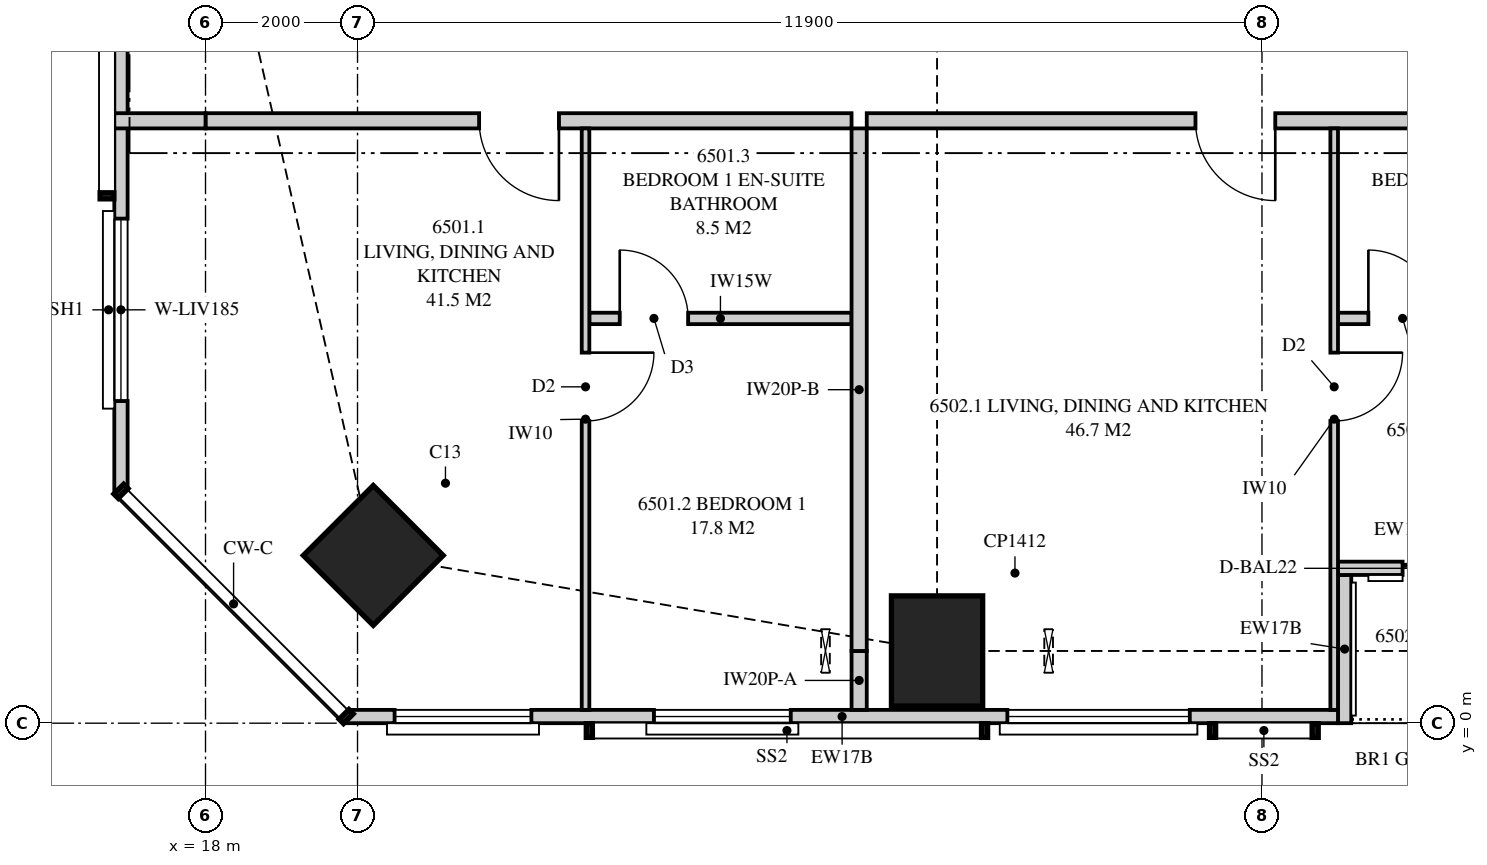
"""IFC4 building model, lengths in metres.
Left out: names, types, materials, properties, quantities, classifications, styles, units other than length and angle.
Written with IfcOpenShell. Run it as: python <this file> out.ifc"""

import sys

from ifc_helpers import new_model, si_unit, direction, frame, frame_2d, origin, origin_2d, place, context, subcontext, project, spatial, polyline, rectangle, outline, extrude, element, fill, save


model = new_model("IFC4")
c1 = context("Model", 3, precision=1e-05, world=origin(), true_north=direction((0.0, 1.0)))
c2 = subcontext(c1, "Body", "Model", "MODEL_VIEW")
j1 = project(units=[si_unit("LENGTHUNIT", "METRE"), si_unit("PLANEANGLEUNIT", "RADIAN")], contexts=[c1])
p1 = place(None, origin())
s1 = spatial("IfcSite", under=j1, at=p1, CompositionType="ELEMENT")
p2 = place(p1, origin())
s2 = spatial("IfcBuilding", under=s1, at=p2, CompositionType="ELEMENT")
p3 = place(p2, frame((0.0, 0.0, 238.95)))
s3 = spatial("IfcBuildingStorey", under=s2, at=p3, CompositionType="ELEMENT", Elevation=238.95)
p4 = place(p3, frame((20.207, 2.207, 0.0), z_axis=(0.0, 0.0, 1.0), x_axis=(0.707106781187, 0.707106781187, 0.0)))
e1 = element("IfcColumn", 1, at=p4, inside=s3, PredefinedType="COLUMN", context=c2, shape_type="SweptSolid", body=[
    extrude(rectangle(XDim=1.3, YDim=1.3, at=origin_2d()), origin(), (0.0, 0.0, 1.0), 3.5),
])
p5 = place(p3, frame((27.625, 0.95, 0.0), z_axis=(0.0, 0.0, 1.0), x_axis=(0.0, 1.0, 0.0)))
e2 = element("IfcColumn", 2, at=p5, inside=s3, PredefinedType="COLUMN", context=c2, shape_type="SweptSolid", body=[
    extrude(rectangle(XDim=1.45, YDim=1.2, at=origin_2d()), origin(), (0.0, 0.0, 1.0), 3.5),
])
p6 = place(p3, frame((19.851, 0.087, 0.0), z_axis=(0.0, 0.0, 1.0), x_axis=(1.0, 0.0, 0.0)))
e3 = element("IfcWall", 3, at=p6, inside=s3, PredefinedType="SOLIDWALL", context=c2, shape_type="SweptSolid", body=[
    extrude(outline(polyline([(0.0, 0.0), (13.049, 0.0), (13.049, 2.3), (7.774, 2.3), (7.774, 3.26), (7.642, 3.26), (7.642, 2.3), (7.559, 2.3), (7.559, 3.26), (0.0, 3.26), (0.0, 0.0)])), frame((0.0, 0.087, 0.0), z_axis=(0.0, -1.0, 0.0), x_axis=(1.0, 0.0, 0.0)), (0.0, 0.0, 1.0), 0.175),
])
p7 = place(p6, frame((0.636, 0.0, 0.4)))
e4 = element("IfcOpeningElement", 4, at=p7, cuts=e3, PredefinedType="OPENING", context=c2, shape_type="SweptSolid", body=[
    extrude(rectangle(XDim=1.8, YDim=1.85, at=frame_2d((0.9, 0.925))), frame((0.0, 0.097, 0.0), z_axis=(0.0, -1.0, 0.0), x_axis=(1.0, 0.0, 0.0)), (0.0, 0.0, 1.0), 0.195),
])
p8 = place(p6, frame((4.049, 0.0, 0.4)))
e5 = element("IfcOpeningElement", 5, at=p8, cuts=e3, PredefinedType="OPENING", context=c2, shape_type="SweptSolid", body=[
    extrude(rectangle(XDim=1.8, YDim=1.85, at=frame_2d((0.9, 0.925))), frame((0.0, 0.097, 0.0), z_axis=(0.0, -1.0, 0.0), x_axis=(1.0, 0.0, 0.0)), (0.0, 0.0, 1.0), 0.195),
])
p9 = place(p6, frame((8.699, 0.0, 0.4)))
e6 = element("IfcOpeningElement", 6, at=p9, cuts=e3, PredefinedType="OPENING", context=c2, shape_type="SweptSolid", body=[
    extrude(rectangle(XDim=2.4, YDim=1.85, at=frame_2d((1.2, 0.925))), frame((0.0, 0.097, 0.0), z_axis=(0.0, -1.0, 0.0), x_axis=(1.0, 0.0, 0.0)), (0.0, 0.0, 1.0), 0.195),
])
p10 = place(p3, frame((32.9, 2.038, 0.0), z_axis=(0.0, 0.0, 1.0), x_axis=(1.0, 0.0, 0.0)))
e7 = element("IfcWall", 7, at=p10, inside=s3, PredefinedType="SOLIDWALL", context=c2, shape_type="SweptSolid", body=[
    extrude(outline(polyline([(0.0, 0.0), (3.5, 0.0), (3.5, 2.66), (3.15, 2.66), (3.15, 3.26), (0.0, 3.26), (0.0, 0.0)])), frame((0.0, 0.087, 0.0), z_axis=(0.0, -1.0, 0.0), x_axis=(1.0, 0.0, 0.0)), (0.0, 0.0, 1.0), 0.175),
])
p11 = place(p10, frame((0.85, 0.0, 0.0)))
e8 = element("IfcOpeningElement", 8, at=p11, cuts=e7, PredefinedType="OPENING", context=c2, shape_type="SweptSolid", body=[
    extrude(rectangle(XDim=1.8, YDim=2.25, at=frame_2d((0.9, 1.125))), frame((0.0, 0.097, 0.0), z_axis=(0.0, -1.0, 0.0), x_axis=(1.0, 0.0, 0.0)), (0.0, 0.0, 1.0), 0.195),
])
p12 = place(p3, frame((32.988, 0.0, 0.0), z_axis=(0.0, 0.0, 1.0), x_axis=(0.0, 1.0, 0.0)))
e9 = element("IfcWall", 9, at=p12, inside=s3, PredefinedType="SOLIDWALL", context=c2, shape_type="SweptSolid", body=[
    extrude(outline(polyline([(0.0, 0.0), (1.95, 0.0), (1.95, 3.26), (1.75, 3.26), (1.75, 2.3), (0.15, 2.3), (0.15, 3.26), (0.0, 3.26), (0.0, 0.0)])), frame((0.0, 0.087, 0.0), z_axis=(0.0, -1.0, 0.0), x_axis=(1.0, 0.0, 0.0)), (0.0, 0.0, 1.0), 0.175),
])
p13 = place(p3, frame((16.887, 30.949, 0.0), z_axis=(0.0, 0.0, 1.0), x_axis=(0.0, -1.0, 0.0)))
e10 = element("IfcWall", 10, at=p13, inside=s3, PredefinedType="SOLIDWALL", context=c2, shape_type="SweptSolid", body=[
    extrude(outline(polyline([(0.0, 0.0), (27.897, 0.0), (27.897, 3.26), (18.148, 3.26), (18.148, 2.3), (18.125, 2.3), (18.125, 3.26), (17.949, 3.26), (17.949, 2.3), (5.949, 2.3), (5.949, 3.26), (0.0, 3.26), (0.0, 0.0)])), frame((0.0, 0.087, 0.0), z_axis=(0.0, -1.0, 0.0), x_axis=(1.0, 0.0, 0.0)), (0.0, 0.0, 1.0), 0.175),
])
p14 = place(p13, frame((11.849, 0.0, 0.4)))
e11 = element("IfcOpeningElement", 11, at=p14, cuts=e10, PredefinedType="OPENING", context=c2, shape_type="SweptSolid", body=[
    extrude(rectangle(XDim=1.2, YDim=1.85, at=frame_2d((0.6, 0.925))), frame((0.0, 0.097, 0.0), z_axis=(0.0, -1.0, 0.0), x_axis=(1.0, 0.0, 0.0)), (0.0, 0.0, 1.0), 0.195),
])
p15 = place(p13, frame((24.311, 0.0, 0.4)))
e12 = element("IfcOpeningElement", 12, at=p15, cuts=e10, PredefinedType="OPENING", context=c2, shape_type="SweptSolid", body=[
    extrude(rectangle(XDim=2.4, YDim=1.85, at=frame_2d((1.2, 0.925))), frame((0.0, 0.097, 0.0), z_axis=(0.0, -1.0, 0.0), x_axis=(1.0, 0.0, 0.0)), (0.0, 0.0, 1.0), 0.195),
])
p16 = place(p3, frame((26.6, 0.175, 0.0), z_axis=(0.0, 0.0, 1.0), x_axis=(0.0, 1.0, 0.0)))
e13 = element("IfcWall", 13, at=p16, inside=s3, PredefinedType="PARTITIONING", context=c2, shape_type="SweptSolid", body=[
    extrude(outline(polyline([(0.0, 0.0), (0.775, 0.0), (0.775, 2.3), (0.026, 2.3), (0.026, 3.26), (0.0, 3.26), (0.0, 0.0)])), frame((0.0, 0.1, 0.0), z_axis=(0.0, -1.0, 0.0), x_axis=(1.0, 0.0, 0.0)), (0.0, 0.0, 1.0), 0.2),
])
p17 = place(p3, frame((26.6, 0.95, 0.0), z_axis=(0.0, 0.0, 1.0), x_axis=(0.0, 1.0, 0.0)))
e14 = element("IfcWall", 14, at=p17, inside=s3, PredefinedType="PARTITIONING", context=c2, shape_type="SweptSolid", body=[
    extrude(outline(polyline([(0.0, 0.0), (6.875, 0.0), (6.875, 2.66), (1.097, 2.66), (1.097, 2.3), (0.0, 2.3), (0.0, 0.0)])), frame((0.0, 0.1, 0.0), z_axis=(0.0, -1.0, 0.0), x_axis=(1.0, 0.0, 0.0)), (0.0, 0.0, 1.0), 0.2),
])
p18 = place(p3, frame((18.0, 7.925, 0.0), z_axis=(0.0, 0.0, 1.0), x_axis=(1.0, 0.0, 0.0)))
e15 = element("IfcWall", 15, at=p18, inside=s3, PredefinedType="PARTITIONING", context=c2, shape_type="SweptSolid", body=[
    extrude(outline(polyline([(0.0, 0.0), (8.5, 0.0), (8.5, 3.26), (8.5, 2.66), (8.315, 2.66), (8.315, 3.26), (1.839, 3.26), (1.839, 2.3), (0.0, 2.3), (0.0, 3.26), (0.0, 0.0)])), frame((0.0, 0.1, 0.0), z_axis=(0.0, -1.0, 0.0), x_axis=(1.0, 0.0, 0.0)), (0.0, 0.0, 1.0), 0.2),
])
p19 = place(p18, frame((3.6, 0.0, 0.0)))
e16 = element("IfcOpeningElement", 16, at=p19, cuts=e15, PredefinedType="OPENING", context=c2, shape_type="SweptSolid", body=[
    extrude(rectangle(XDim=1.05, YDim=2.2, at=frame_2d((0.525, 1.1))), frame((0.0, 0.11, 0.0), z_axis=(0.0, -1.0, 0.0), x_axis=(1.0, 0.0, 0.0)), (0.0, 0.0, 1.0), 0.22),
])
p20 = place(p3, frame((23.0, 0.175, 0.0), z_axis=(0.0, 0.0, 1.0), x_axis=(0.0, 1.0, 0.0)))
e17 = element("IfcWall", 17, at=p20, inside=s3, PredefinedType="PARTITIONING", context=c2, shape_type="SweptSolid", body=[
    extrude(outline(polyline([(0.0, 0.0), (7.65, 0.0), (7.65, 3.26), (2.431, 3.26), (2.431, 2.3), (0.687, 2.3), (0.687, 3.26), (0.0, 3.26), (0.0, 0.0)])), frame((0.0, 0.05, 0.0), z_axis=(0.0, -1.0, 0.0), x_axis=(1.0, 0.0, 0.0)), (0.0, 0.0, 1.0), 0.1),
])
p21 = place(p20, frame((3.8, 0.0, 0.0)))
e18 = element("IfcOpeningElement", 18, at=p21, cuts=e17, PredefinedType="OPENING", context=c2, shape_type="SweptSolid", body=[
    extrude(rectangle(XDim=0.9, YDim=2.1, at=frame_2d((0.45, 1.05))), frame((0.0, 0.06, 0.0), z_axis=(0.0, -1.0, 0.0), x_axis=(1.0, 0.0, 0.0)), (0.0, 0.0, 1.0), 0.12),
])
p22 = place(p3, frame((23.05, 5.325, 0.0), z_axis=(0.0, 0.0, 1.0), x_axis=(1.0, 0.0, 0.0)))
e19 = element("IfcWall", 19, at=p22, inside=s3, PredefinedType="PLUMBINGWALL", context=c2, shape_type="SweptSolid", body=[
    extrude(outline(polyline([(0.0, 0.0), (3.45, 0.0), (3.45, 3.26), (3.45, 2.66), (3.29, 2.66), (3.29, 3.26), (0.0, 3.26), (0.0, 0.0)])), frame((0.0, 0.075, 0.0), z_axis=(0.0, -1.0, 0.0), x_axis=(1.0, 0.0, 0.0)), (0.0, 0.0, 1.0), 0.15),
])
p23 = place(p22, frame((0.4, 0.0, 0.0)))
e20 = element("IfcOpeningElement", 20, at=p23, cuts=e19, PredefinedType="OPENING", context=c2, shape_type="SweptSolid", body=[
    extrude(rectangle(XDim=0.9, YDim=2.1, at=frame_2d((0.45, 1.05))), frame((0.0, 0.085, 0.0), z_axis=(0.0, -1.0, 0.0), x_axis=(1.0, 0.0, 0.0)), (0.0, 0.0, 1.0), 0.17),
])
p24 = place(p3, frame((26.7, 7.925, 0.0), z_axis=(0.0, 0.0, 1.0), x_axis=(1.0, 0.0, 0.0)))
e21 = element("IfcWall", 21, at=p24, inside=s3, PredefinedType="PARTITIONING", context=c2, shape_type="SweptSolid", body=[
    extrude(outline(polyline([(0.0, 0.0), (9.65, 0.0), (9.65, 3.26), (9.65, 2.66), (9.24, 2.66), (9.24, 3.26), (2.235, 3.26), (2.235, 2.66), (0.0, 2.66), (0.0, 3.26), (0.0, 0.0)])), frame((0.0, 0.1, 0.0), z_axis=(0.0, -1.0, 0.0), x_axis=(1.0, 0.0, 0.0)), (0.0, 0.0, 1.0), 0.2),
])
p25 = place(p24, frame((4.325, 0.0, 0.0)))
e22 = element("IfcOpeningElement", 22, at=p25, cuts=e21, PredefinedType="OPENING", context=c2, shape_type="SweptSolid", body=[
    extrude(rectangle(XDim=1.05, YDim=2.2, at=frame_2d((0.525, 1.1))), frame((0.0, 0.11, 0.0), z_axis=(0.0, -1.0, 0.0), x_axis=(1.0, 0.0, 0.0)), (0.0, 0.0, 1.0), 0.22),
])
p26 = place(p3, frame((32.85, 0.175, 0.0), z_axis=(0.0, 0.0, 1.0), x_axis=(0.0, 1.0, 0.0)))
e23 = element("IfcWall", 23, at=p26, inside=s3, PredefinedType="PARTITIONING", context=c2, shape_type="SweptSolid", body=[
    extrude(outline(polyline([(0.0, 0.0), (7.65, 0.0), (7.65, 3.26), (1.635, 3.26), (1.635, 2.3), (0.0, 2.3), (0.0, 3.26), (0.0, 0.0)])), frame((0.0, 0.05, 0.0), z_axis=(0.0, -1.0, 0.0), x_axis=(1.0, 0.0, 0.0)), (0.0, 0.0, 1.0), 0.1),
])
p27 = place(p26, frame((3.8, 0.0, 0.0)))
e24 = element("IfcOpeningElement", 24, at=p27, cuts=e23, PredefinedType="OPENING", context=c2, shape_type="SweptSolid", body=[
    extrude(rectangle(XDim=0.9, YDim=2.1, at=frame_2d((0.45, 1.05))), frame((0.0, 0.06, 0.0), z_axis=(0.0, -1.0, 0.0), x_axis=(1.0, 0.0, 0.0)), (0.0, 0.0, 1.0), 0.12),
])
p28 = place(p3, frame((32.9, 5.325, 0.0), z_axis=(0.0, 0.0, 1.0), x_axis=(1.0, 0.0, 0.0)))
e25 = element("IfcWall", 25, at=p28, inside=s3, PredefinedType="PLUMBINGWALL", context=c2, shape_type="SweptSolid", body=[
    extrude(outline(polyline([(0.0, 0.0), (3.45, 0.0), (3.45, 3.26), (3.45, 2.66), (3.065, 2.66), (3.065, 3.26), (0.0, 3.26), (0.0, 0.0)])), frame((0.0, 0.075, 0.0), z_axis=(0.0, -1.0, 0.0), x_axis=(1.0, 0.0, 0.0)), (0.0, 0.0, 1.0), 0.15),
])
p29 = place(p28, frame((0.4, 0.0, 0.0)))
e26 = element("IfcOpeningElement", 26, at=p29, cuts=e25, PredefinedType="OPENING", context=c2, shape_type="SweptSolid", body=[
    extrude(rectangle(XDim=0.9, YDim=2.1, at=frame_2d((0.45, 1.05))), frame((0.0, 0.085, 0.0), z_axis=(0.0, -1.0, 0.0), x_axis=(1.0, 0.0, 0.0)), (0.0, 0.0, 1.0), 0.17),
])
p30 = place(p3, frame((16.8, 7.925, 0.0), z_axis=(0.0, 0.0, 1.0), x_axis=(1.0, 0.0, 0.0)))
e27 = element("IfcWall", 27, at=p30, inside=s3, PredefinedType="PARTITIONING", context=c2, shape_type="SweptSolid", body=[
    extrude(outline(polyline([(0.0, 0.0), (1.2, 0.0), (1.2, 3.26), (1.2, 2.3), (1.172, 2.3), (1.172, 3.26), (0.0, 3.26), (0.0, 0.0)])), frame((0.0, 0.1, 0.0), z_axis=(0.0, -1.0, 0.0), x_axis=(1.0, 0.0, 0.0)), (0.0, 0.0, 1.0), 0.2),
])
p31 = place(p7, origin())
e28 = element("IfcWindow", 28, at=p31, inside=s3, PartitioningType="SINGLE_PANEL", PredefinedType="WINDOW", context=c2, shape_type="SweptSolid", body=[
    extrude(rectangle(XDim=1.8, YDim=1.85, at=frame_2d((0.9, 0.925))), frame((0.0, 0.03, 0.0), z_axis=(0.0, -1.0, 0.0), x_axis=(1.0, 0.0, 0.0)), (0.0, 0.0, 1.0), 0.06),
])
fill(e4, e28)
p32 = place(p8, origin())
e29 = element("IfcWindow", 29, at=p32, inside=s3, PartitioningType="SINGLE_PANEL", PredefinedType="WINDOW", context=c2, shape_type="SweptSolid", body=[
    extrude(rectangle(XDim=1.8, YDim=1.85, at=frame_2d((0.9, 0.925))), frame((0.0, 0.03, 0.0), z_axis=(0.0, -1.0, 0.0), x_axis=(1.0, 0.0, 0.0)), (0.0, 0.0, 1.0), 0.06),
])
fill(e5, e29)
p33 = place(p9, origin())
e30 = element("IfcWindow", 30, at=p33, inside=s3, PartitioningType="SINGLE_PANEL", PredefinedType="WINDOW", context=c2, shape_type="SweptSolid", body=[
    extrude(rectangle(XDim=2.4, YDim=1.85, at=frame_2d((1.2, 0.925))), frame((0.0, 0.03, 0.0), z_axis=(0.0, -1.0, 0.0), x_axis=(1.0, 0.0, 0.0)), (0.0, 0.0, 1.0), 0.06),
])
fill(e6, e30)
p34 = place(p11, origin())
e31 = element("IfcDoor", 31, at=p34, inside=s3, OperationType="SLIDING_TO_LEFT", PredefinedType="DOOR", context=c2, shape_type="SweptSolid", body=[
    extrude(rectangle(XDim=1.8, YDim=2.25, at=frame_2d((0.9, 1.125))), frame((0.0, 0.025, 0.0), z_axis=(0.0, -1.0, 0.0), x_axis=(1.0, 0.0, 0.0)), (0.0, 0.0, 1.0), 0.05),
])
fill(e8, e31)
p35 = place(p15, origin())
e32 = element("IfcWindow", 32, at=p35, inside=s3, PartitioningType="SINGLE_PANEL", PredefinedType="WINDOW", context=c2, shape_type="SweptSolid", body=[
    extrude(rectangle(XDim=2.4, YDim=1.85, at=frame_2d((1.2, 0.925))), frame((0.0, 0.03, 0.0), z_axis=(0.0, -1.0, 0.0), x_axis=(1.0, 0.0, 0.0)), (0.0, 0.0, 1.0), 0.06),
])
fill(e12, e32)
p36 = place(p19, frame((1.05, 0.0, 0.0), z_axis=(0.0, 0.0, 1.0), x_axis=(-1.0, 0.0, 0.0)))
e33 = element("IfcDoor", 33, at=p36, inside=s3, OperationType="SINGLE_SWING_LEFT", PredefinedType="DOOR", context=c2, shape_type="SweptSolid", body=[
    extrude(rectangle(XDim=1.05, YDim=2.2, at=frame_2d((0.525, 1.1))), frame((0.0, 0.025, 0.0), z_axis=(0.0, -1.0, 0.0), x_axis=(1.0, 0.0, 0.0)), (0.0, 0.0, 1.0), 0.05),
])
fill(e16, e33)
p37 = place(p21, frame((0.9, 0.0, 0.0), z_axis=(0.0, 0.0, 1.0), x_axis=(-1.0, 0.0, 0.0)))
e34 = element("IfcDoor", 34, at=p37, inside=s3, OperationType="SINGLE_SWING_LEFT", PredefinedType="DOOR", context=c2, shape_type="SweptSolid", body=[
    extrude(rectangle(XDim=0.9, YDim=2.1, at=frame_2d((0.45, 1.05))), frame((0.0, 0.025, 0.0), z_axis=(0.0, -1.0, 0.0), x_axis=(1.0, 0.0, 0.0)), (0.0, 0.0, 1.0), 0.05),
])
fill(e18, e34)
p38 = place(p23, origin())
e35 = element("IfcDoor", 35, at=p38, inside=s3, OperationType="SINGLE_SWING_LEFT", PredefinedType="DOOR", context=c2, shape_type="SweptSolid", body=[
    extrude(rectangle(XDim=0.9, YDim=2.1, at=frame_2d((0.45, 1.05))), frame((0.0, 0.025, 0.0), z_axis=(0.0, -1.0, 0.0), x_axis=(1.0, 0.0, 0.0)), (0.0, 0.0, 1.0), 0.05),
])
fill(e20, e35)
p39 = place(p25, frame((1.05, 0.0, 0.0), z_axis=(0.0, 0.0, 1.0), x_axis=(-1.0, 0.0, 0.0)))
e36 = element("IfcDoor", 36, at=p39, inside=s3, OperationType="SINGLE_SWING_LEFT", PredefinedType="DOOR", context=c2, shape_type="SweptSolid", body=[
    extrude(rectangle(XDim=1.05, YDim=2.2, at=frame_2d((0.525, 1.1))), frame((0.0, 0.025, 0.0), z_axis=(0.0, -1.0, 0.0), x_axis=(1.0, 0.0, 0.0)), (0.0, 0.0, 1.0), 0.05),
])
fill(e22, e36)
p40 = place(p27, frame((0.9, 0.0, 0.0), z_axis=(0.0, 0.0, 1.0), x_axis=(-1.0, 0.0, 0.0)))
e37 = element("IfcDoor", 37, at=p40, inside=s3, OperationType="SINGLE_SWING_LEFT", PredefinedType="DOOR", context=c2, shape_type="SweptSolid", body=[
    extrude(rectangle(XDim=0.9, YDim=2.1, at=frame_2d((0.45, 1.05))), frame((0.0, 0.025, 0.0), z_axis=(0.0, -1.0, 0.0), x_axis=(1.0, 0.0, 0.0)), (0.0, 0.0, 1.0), 0.05),
])
fill(e24, e37)
p41 = place(p29, origin())
e38 = element("IfcDoor", 38, at=p41, inside=s3, OperationType="SINGLE_SWING_LEFT", PredefinedType="DOOR", context=c2, shape_type="SweptSolid", body=[
    extrude(rectangle(XDim=0.9, YDim=2.1, at=frame_2d((0.45, 1.05))), frame((0.0, 0.025, 0.0), z_axis=(0.0, -1.0, 0.0), x_axis=(1.0, 0.0, 0.0)), (0.0, 0.0, 1.0), 0.05),
])
fill(e26, e38)
save(model, sys.argv[1])
